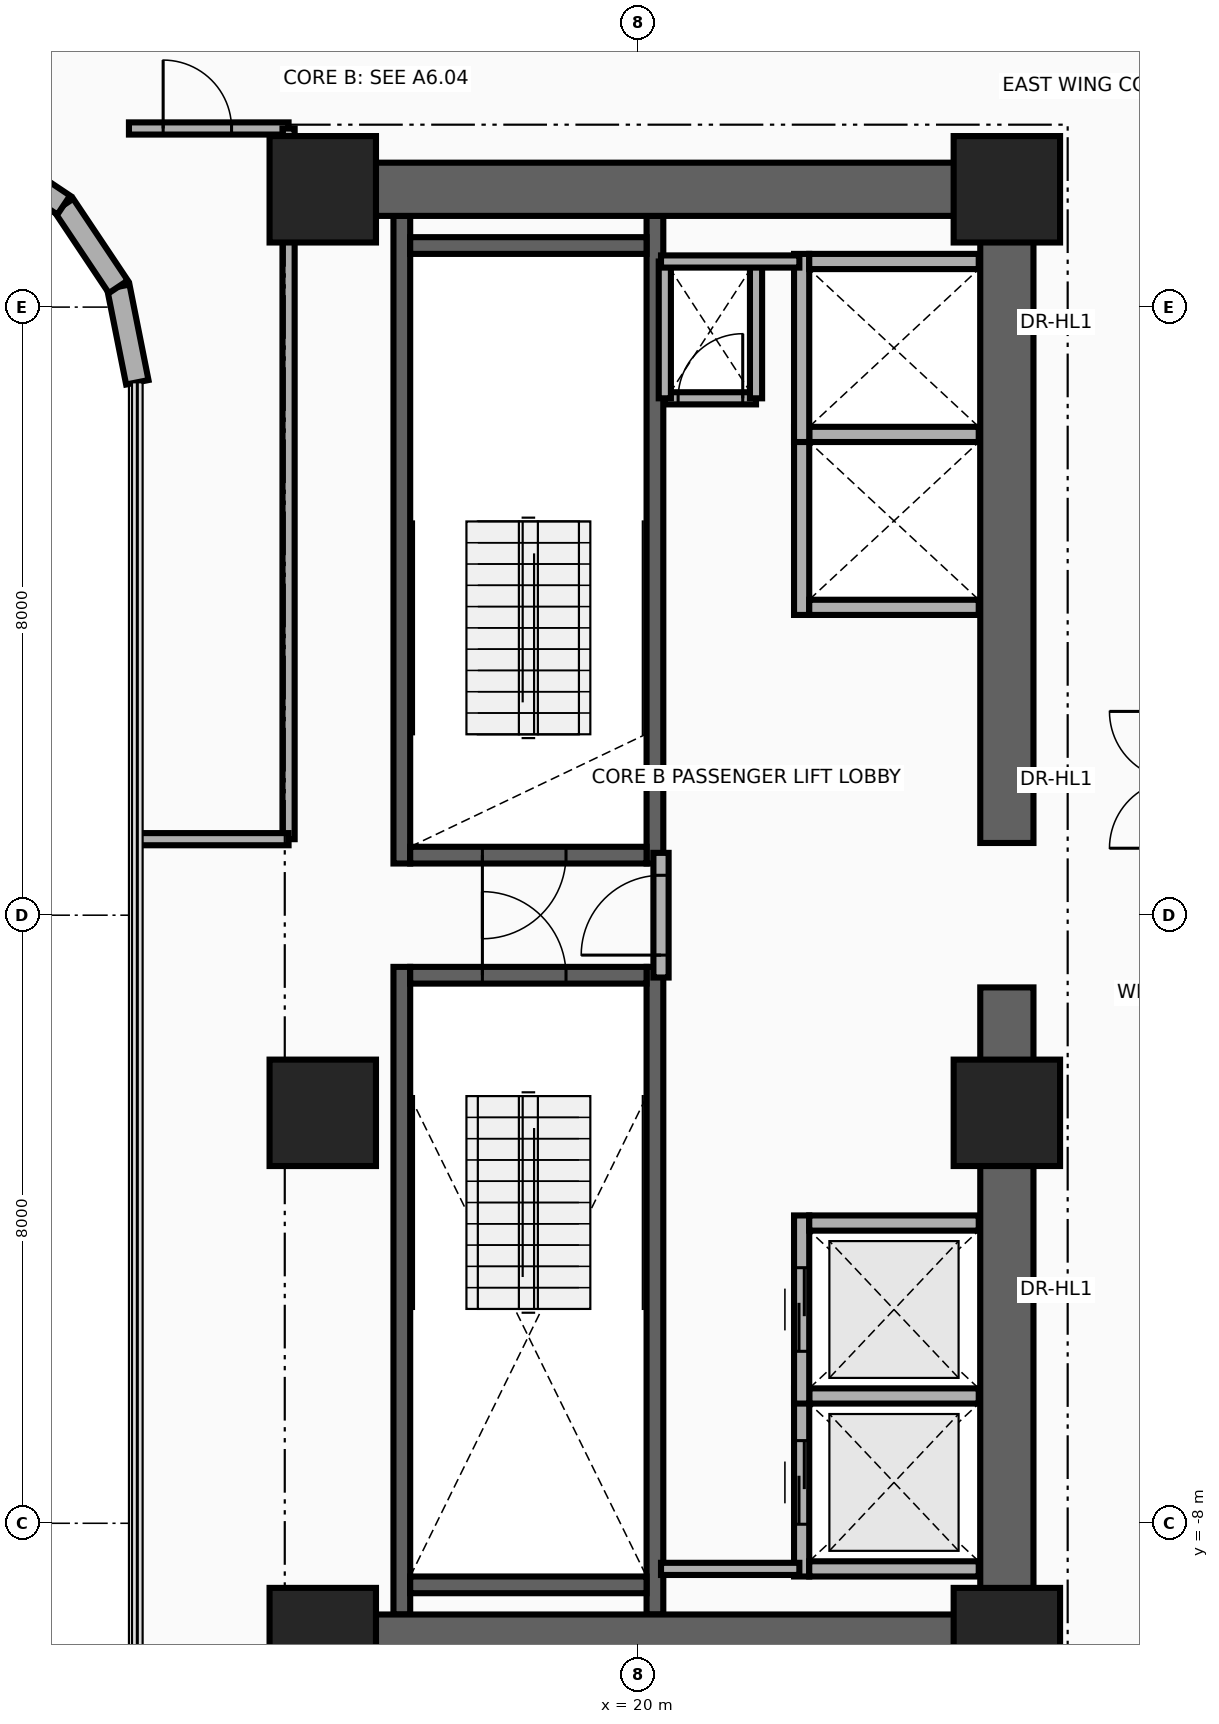
"""IFC4 building model, lengths in metres.
Left out: names, types, materials, properties, quantities, classifications, styles, units other than length and angle.
Written with IfcOpenShell. Run it as: python <this file> out.ifc"""

import sys

from ifc_helpers import new_model, si_unit, direction, frame, frame_2d, origin, origin_2d, place, context, subcontext, project, spatial, rectangle, extrude, source, transform, mapped, element, fill, save


model = new_model("IFC4")
c1 = context("Model", 3, precision=1e-05, world=origin(), true_north=direction((0.0, 1.0)))
c2 = subcontext(c1, "Body", "Model", "MODEL_VIEW")
j1 = project(units=[si_unit("LENGTHUNIT", "METRE"), si_unit("PLANEANGLEUNIT", "RADIAN")], contexts=[c1])
p1 = place(None, origin())
s1 = spatial("IfcSite", under=j1, at=p1, CompositionType="ELEMENT")
p2 = place(p1, origin())
s2 = spatial("IfcBuilding", under=s1, at=p2, CompositionType="ELEMENT")
p3 = place(p2, frame((0.0, 0.0, 40.8)))
s3 = spatial("IfcBuildingStorey", under=s2, at=p3, CompositionType="ELEMENT", Elevation=40.8)
for number, where, z_axis, x_axis in (
    (1, (16.89, 0.68, 0.0), (0.0, 0.0, 1.0), (0.0, 1.0, 0.0)),
    (2, (20.22, 0.68, 0.0), (0.0, 0.0, 1.0), (0.0, 1.0, 0.0)),
):
    element("IfcWall", number, at=place(p3, frame(where, z_axis=z_axis, x_axis=x_axis)), inside=s3, PredefinedType="SHEAR", context=c2, shape_type="SweptSolid", body=[
        extrude(rectangle(XDim=8.52, YDim=0.22, at=frame_2d((4.26, 0.0))), origin(), (0.0, 0.0, 1.0), 3.46),
    ])
p4 = place(p3, frame((17.0, 0.79, 0.0), z_axis=(0.0, 0.0, 1.0), x_axis=(1.0, 0.0, 0.0)))
e3 = element("IfcWall", 3, at=p4, inside=s3, PredefinedType="SHEAR", context=c2, shape_type="SweptSolid", body=[
    extrude(rectangle(XDim=3.11, YDim=0.22, at=frame_2d((1.555, 0.0))), origin(), (0.0, 0.0, 1.0), 3.46),
])
p5 = place(p4, frame((0.95, 0.0, 0.0)))
e4 = element("IfcOpeningElement", 4, at=p5, cuts=e3, PredefinedType="OPENING", context=c2, shape_type="SweptSolid", body=[
    extrude(rectangle(XDim=1.1, YDim=2.15, at=frame_2d((0.55, 1.075))), frame((0.0, 0.125, 0.0), z_axis=(0.0, -1.0, 0.0), x_axis=(1.0, 0.0, 0.0)), (0.0, 0.0, 1.0), 0.25),
])
p6 = place(p3, frame((17.0, 8.81, 0.0), z_axis=(0.0, 0.0, 1.0), x_axis=(1.0, 0.0, 0.0)))
e5 = element("IfcWall", 5, at=p6, inside=s3, PredefinedType="SHEAR", context=c2, shape_type="SweptSolid", body=[
    extrude(rectangle(XDim=3.11, YDim=0.22, at=frame_2d((1.555, 0.0))), origin(), (0.0, 0.0, 1.0), 3.46),
])
for number, where, z_axis, x_axis in (
    (6, (16.89, -9.2, 0.0), (0.0, 0.0, 1.0), (0.0, 1.0, 0.0)),
    (7, (20.22, -9.2, 0.0), (0.0, 0.0, 1.0), (0.0, 1.0, 0.0)),
):
    element("IfcWall", number, at=place(p3, frame(where, z_axis=z_axis, x_axis=x_axis)), inside=s3, PredefinedType="SHEAR", context=c2, shape_type="SweptSolid", body=[
        extrude(rectangle(XDim=8.52, YDim=0.22, at=frame_2d((4.26, 0.0))), origin(), (0.0, 0.0, 1.0), 3.46),
    ])
p7 = place(p3, frame((17.0, -8.81, 0.0), z_axis=(0.0, 0.0, 1.0), x_axis=(1.0, 0.0, 0.0)))
e8 = element("IfcWall", 8, at=p7, inside=s3, PredefinedType="SHEAR", context=c2, shape_type="SweptSolid", body=[
    extrude(rectangle(XDim=3.11, YDim=0.22, at=frame_2d((1.555, 0.0))), origin(), (0.0, 0.0, 1.0), 3.46),
])
p8 = place(p3, frame((17.0, -0.79, 0.0), z_axis=(0.0, 0.0, 1.0), x_axis=(1.0, 0.0, 0.0)))
e9 = element("IfcWall", 9, at=p8, inside=s3, PredefinedType="SHEAR", context=c2, shape_type="SweptSolid", body=[
    extrude(rectangle(XDim=3.11, YDim=0.22, at=frame_2d((1.555, 0.0))), origin(), (0.0, 0.0, 1.0), 3.46),
])
p9 = place(p8, frame((0.95, 0.0, 0.0)))
e10 = element("IfcOpeningElement", 10, at=p9, cuts=e9, PredefinedType="OPENING", context=c2, shape_type="SweptSolid", body=[
    extrude(rectangle(XDim=1.1, YDim=2.15, at=frame_2d((0.55, 1.075))), frame((0.0, 0.125, 0.0), z_axis=(0.0, -1.0, 0.0), x_axis=(1.0, 0.0, 0.0)), (0.0, 0.0, 1.0), 0.25),
])
for number, where, z_axis, x_axis in (
    (11, (24.85, -9.9, 0.0), (0.0, 0.0, 1.0), (0.0, 1.0, 0.0)),
    (12, (24.85, 0.95, 0.0), (0.0, 0.0, 1.0), (0.0, 1.0, 0.0)),
):
    element("IfcWall", number, at=place(p3, frame(where, z_axis=z_axis, x_axis=x_axis)), inside=s3, PredefinedType="SHEAR", context=c2, shape_type="SweptSolid", body=[
        extrude(rectangle(XDim=8.95, YDim=0.7, at=frame_2d((4.475, 0.0))), origin(), (0.0, 0.0, 1.0), 3.46),
    ])
for number, where, z_axis, x_axis in (
    (13, (15.85, 9.55, 0.0), (0.0, 0.0, 1.0), (1.0, 0.0, 0.0)),
    (14, (15.85, -9.55, 0.0), (0.0, 0.0, 1.0), (1.0, 0.0, 0.0)),
):
    element("IfcWall", number, at=place(p3, frame(where, z_axis=z_axis, x_axis=x_axis)), inside=s3, PredefinedType="SHEAR", context=c2, shape_type="SweptSolid", body=[
        extrude(rectangle(XDim=9.0, YDim=0.7, at=frame_2d((4.5, 0.0))), origin(), (0.0, 0.0, 1.0), 3.46),
    ])
m1 = source(origin(), c2, "Body", "SweptSolid", [
    extrude(rectangle(XDim=1.4, YDim=1.4, at=origin_2d()), origin(), (0.0, 0.0, 1.0), 3.7),
])
for number, where, z_axis, x_axis in (
    (15, (15.85, -9.55, 0.0), (0.0, 0.0, 1.0), (1.0, 0.0, 0.0)),
    (16, (24.85, -9.55, 0.0), (0.0, 0.0, 1.0), (1.0, 0.0, 0.0)),
    (17, (15.85, -2.6, 0.0), (0.0, 0.0, 1.0), (1.0, 0.0, 0.0)),
    (18, (24.85, -2.6, 0.0), (0.0, 0.0, 1.0), (1.0, 0.0, 0.0)),
    (19, (15.85, 9.55, 0.0), (0.0, 0.0, 1.0), (1.0, 0.0, 0.0)),
    (20, (24.85, 9.55, 0.0), (0.0, 0.0, 1.0), (1.0, 0.0, 0.0)),
):
    element("IfcColumn", number, at=place(p3, frame(where, z_axis=z_axis, x_axis=x_axis)), inside=s3, PredefinedType="COLUMN", context=c2, shape_type="MappedRepresentation", body=[
        mapped(m1, transform((0.0, 0.0, 0.0), x_axis=(1.0, 0.0, 0.0), y_axis=(0.0, 1.0, 0.0), z_axis=(0.0, 0.0, 1.0), scale=1.0)),
    ])
p10 = place(p3, frame((13.41, 7.011, 0.0), z_axis=(0.0, 0.0, 1.0), x_axis=(-0.195090163074, 0.980785312019, 0.0)))
e21 = element("IfcWall", 21, at=p10, inside=s3, PredefinedType="SOLIDWALL", context=c2, shape_type="SweptSolid", body=[
    extrude(rectangle(XDim=1.281, YDim=0.3, at=frame_2d((0.641, 0.0))), origin(), (0.0, 0.0, 1.0), 3.46),
])
for number, where, z_axis, x_axis in (
    (22, (13.16, 8.268, 0.0), (0.0, 0.0, 1.0), (-0.556, 0.831, 0.0)),
    (23, (12.442, 9.342, 0.0), (0.0, 0.0, 1.0), (-0.831, 0.556, 0.0)),
):
    element("IfcWall", number, at=place(p3, frame(where, z_axis=z_axis, x_axis=x_axis)), inside=s3, PredefinedType="SOLIDWALL", context=c2, shape_type="SweptSolid", body=[
        extrude(rectangle(XDim=1.292, YDim=0.3, at=frame_2d((0.646, 0.0))), origin(), (0.0, 0.0, 1.0), 3.46),
    ])
p11 = place(p3, frame((22.15, -8.7, 0.0), z_axis=(0.0, 0.0, 1.0), x_axis=(0.0, 1.0, 0.0)))
e24 = element("IfcWall", 24, at=p11, inside=s3, PredefinedType="MOVABLE", context=c2, shape_type="SweptSolid", body=[
    extrude(rectangle(XDim=2.475, YDim=0.2, at=frame_2d((1.237, 0.0))), origin(), (0.0, 0.0, 1.0), 3.46),
])
p12 = place(p11, frame((0.688, 0.0, 0.0)))
e25 = element("IfcOpeningElement", 25, at=p12, cuts=e24, PredefinedType="OPENING", context=c2, shape_type="SweptSolid", body=[
    extrude(rectangle(XDim=1.1, YDim=2.1, at=frame_2d((0.55, 1.05))), frame((0.0, 0.115, 0.0), z_axis=(0.0, -1.0, 0.0), x_axis=(1.0, 0.0, 0.0)), (0.0, 0.0, 1.0), 0.23),
])
for number, where, z_axis, x_axis in (
    (26, (22.25, -8.6, 0.0), (0.0, 0.0, 1.0), (1.0, 0.0, 0.0)),
    (27, (22.25, -6.325, 0.0), (0.0, 0.0, 1.0), (1.0, 0.0, 0.0)),
):
    element("IfcWall", number, at=place(p3, frame(where, z_axis=z_axis, x_axis=x_axis)), inside=s3, PredefinedType="MOVABLE", context=c2, shape_type="SweptSolid", body=[
        extrude(rectangle(XDim=2.23, YDim=0.2, at=frame_2d((1.115, 0.0))), origin(), (0.0, 0.0, 1.0), 3.46),
    ])
p13 = place(p3, frame((22.15, -6.425, 0.0), z_axis=(0.0, 0.0, 1.0), x_axis=(0.0, 1.0, 0.0)))
e28 = element("IfcWall", 28, at=p13, inside=s3, PredefinedType="MOVABLE", context=c2, shape_type="SweptSolid", body=[
    extrude(rectangle(XDim=2.475, YDim=0.2, at=frame_2d((1.238, 0.0))), origin(), (0.0, 0.0, 1.0), 3.46),
])
p14 = place(p13, frame((0.688, 0.0, 0.0)))
e29 = element("IfcOpeningElement", 29, at=p14, cuts=e28, PredefinedType="OPENING", context=c2, shape_type="SweptSolid", body=[
    extrude(rectangle(XDim=1.1, YDim=2.1, at=frame_2d((0.55, 1.05))), frame((0.0, 0.115, 0.0), z_axis=(0.0, -1.0, 0.0), x_axis=(1.0, 0.0, 0.0)), (0.0, 0.0, 1.0), 0.23),
])
p15 = place(p3, frame((22.25, -4.05, 0.0), z_axis=(0.0, 0.0, 1.0), x_axis=(1.0, 0.0, 0.0)))
e30 = element("IfcWall", 30, at=p15, inside=s3, PredefinedType="MOVABLE", context=c2, shape_type="SweptSolid", body=[
    extrude(rectangle(XDim=2.23, YDim=0.2, at=frame_2d((1.115, 0.0))), origin(), (0.0, 0.0, 1.0), 3.46),
])
p16 = place(p3, frame((22.15, 3.95, 0.0), z_axis=(0.0, 0.0, 1.0), x_axis=(0.0, 1.0, 0.0)))
e31 = element("IfcWall", 31, at=p16, inside=s3, PredefinedType="MOVABLE", context=c2, shape_type="SweptSolid", body=[
    extrude(rectangle(XDim=2.475, YDim=0.2, at=frame_2d((1.238, 0.0))), origin(), (0.0, 0.0, 1.0), 3.46),
])
for number, where, z_axis, x_axis in (
    (32, (22.25, 4.05, 0.0), (0.0, 0.0, 1.0), (1.0, 0.0, 0.0)),
    (33, (22.25, 6.325, 0.0), (0.0, 0.0, 1.0), (1.0, 0.0, 0.0)),
):
    element("IfcWall", number, at=place(p3, frame(where, z_axis=z_axis, x_axis=x_axis)), inside=s3, PredefinedType="MOVABLE", context=c2, shape_type="SweptSolid", body=[
        extrude(rectangle(XDim=2.23, YDim=0.2, at=frame_2d((1.115, 0.0))), origin(), (0.0, 0.0, 1.0), 2.245),
    ])
p17 = place(p3, frame((22.15, 6.225, 0.0), z_axis=(0.0, 0.0, 1.0), x_axis=(0.0, 1.0, 0.0)))
e34 = element("IfcWall", 34, at=p17, inside=s3, PredefinedType="MOVABLE", context=c2, shape_type="SweptSolid", body=[
    extrude(rectangle(XDim=2.475, YDim=0.2, at=frame_2d((1.237, 0.0))), origin(), (0.0, 0.0, 1.0), 3.46),
])
p18 = place(p3, frame((22.25, 8.6, 0.0), z_axis=(0.0, 0.0, 1.0), x_axis=(1.0, 0.0, 0.0)))
e35 = element("IfcWall", 35, at=p18, inside=s3, PredefinedType="MOVABLE", context=c2, shape_type="SweptSolid", body=[
    extrude(rectangle(XDim=2.23, YDim=0.2, at=frame_2d((1.115, 0.0))), origin(), (0.0, 0.0, 1.0), 2.245),
])
p19 = place(p3, frame((20.3, -0.82, 0.0), z_axis=(0.0, 0.0, 1.0), x_axis=(0.0, 1.0, 0.0)))
e36 = element("IfcWall", 36, at=p19, inside=s3, PredefinedType="PARTITIONING", context=c2, shape_type="SweptSolid", body=[
    extrude(rectangle(XDim=1.64, YDim=0.2, at=frame_2d((0.82, 0.0))), origin(), (0.0, 0.0, 1.0), 3.46),
])
p20 = place(p19, frame((0.295, 0.0, 0.0)))
e37 = element("IfcOpeningElement", 37, at=p20, cuts=e36, PredefinedType="OPENING", context=c2, shape_type="SweptSolid", body=[
    extrude(rectangle(XDim=1.05, YDim=2.15, at=frame_2d((0.525, 1.075))), frame((0.0, 0.115, 0.0), z_axis=(0.0, -1.0, 0.0), x_axis=(1.0, 0.0, 0.0)), (0.0, 0.0, 1.0), 0.23),
])
p21 = place(p3, frame((20.35, 6.8, 0.0), z_axis=(0.0, 0.0, 1.0), x_axis=(1.0, 0.0, 0.0)))
e38 = element("IfcWall", 38, at=p21, inside=s3, PredefinedType="PARTITIONING", context=c2, shape_type="SweptSolid", body=[
    extrude(rectangle(XDim=1.2, YDim=0.16, at=frame_2d((0.6, 0.0))), origin(), (0.0, 0.0, 1.0), 3.46),
])
p22 = place(p21, frame((0.175, 0.0, 0.0)))
e39 = element("IfcOpeningElement", 39, at=p22, cuts=e38, PredefinedType="OPENING", context=c2, shape_type="SweptSolid", body=[
    extrude(rectangle(XDim=0.85, YDim=2.05, at=frame_2d((0.425, 1.025))), frame((0.0, 0.095, 0.0), z_axis=(0.0, -1.0, 0.0), x_axis=(1.0, 0.0, 0.0)), (0.0, 0.0, 1.0), 0.19),
])
for number, where, z_axis, x_axis in (
    (40, (21.55, 6.8, 0.0), (0.0, 0.0, 1.0), (0.0, 1.0, 0.0)),
    (41, (20.35, 6.8, 0.0), (0.0, 0.0, 1.0), (0.0, 1.0, 0.0)),
):
    element("IfcWall", number, at=place(p3, frame(where, z_axis=z_axis, x_axis=x_axis)), inside=s3, PredefinedType="PARTITIONING", context=c2, shape_type="SweptSolid", body=[
        extrude(rectangle(XDim=1.8, YDim=0.16, at=frame_2d((0.9, 0.0))), origin(), (0.0, 0.0, 1.0), 3.46),
    ])
for number, where, z_axis, x_axis in (
    (42, (20.3, -8.6, 0.0), (0.0, 0.0, 1.0), (1.0, 0.0, 0.0)),
    (43, (20.3, 8.6, 0.0), (0.0, 0.0, 1.0), (1.0, 0.0, 0.0)),
):
    element("IfcWall", number, at=place(p3, frame(where, z_axis=z_axis, x_axis=x_axis)), inside=s3, PredefinedType="PARTITIONING", context=c2, shape_type="SweptSolid", body=[
        extrude(rectangle(XDim=1.82, YDim=0.16, at=frame_2d((0.91, 0.0))), origin(), (0.0, 0.0, 1.0), 3.46),
    ])
p23 = place(p3, frame((13.3, 10.35, 0.0), z_axis=(0.0, 0.0, 1.0), x_axis=(1.0, 0.0, 0.0)))
e44 = element("IfcWall", 44, at=p23, inside=s3, PredefinedType="PARTITIONING", context=c2, shape_type="SweptSolid", body=[
    extrude(rectangle(XDim=2.1, YDim=0.16, at=frame_2d((1.05, 0.0))), origin(), (0.0, 0.0, 1.0), 2.583),
])
p24 = place(p23, frame((0.45, 0.0, 0.0)))
e45 = element("IfcOpeningElement", 45, at=p24, cuts=e44, PredefinedType="OPENING", context=c2, shape_type="SweptSolid", body=[
    extrude(rectangle(XDim=0.9, YDim=2.1, at=frame_2d((0.45, 1.05))), frame((0.0, 0.095, 0.0), z_axis=(0.0, -1.0, 0.0), x_axis=(1.0, 0.0, 0.0)), (0.0, 0.0, 1.0), 0.19),
])
p25 = place(p3, frame((15.4, 1.0, 0.0), z_axis=(0.0, 0.0, 1.0), x_axis=(0.0, 1.0, 0.0)))
e46 = element("IfcWall", 46, at=p25, inside=s3, PredefinedType="PARTITIONING", context=c2, shape_type="SweptSolid", body=[
    extrude(rectangle(XDim=9.35, YDim=0.16, at=frame_2d((4.675, 0.0))), origin(), (0.0, 0.0, 1.0), 2.245),
])
p26 = place(p3, frame((13.41, 1.0, 0.0), z_axis=(0.0, 0.0, 1.0), x_axis=(1.0, 0.0, 0.0)))
e47 = element("IfcWall", 47, at=p26, inside=s3, PredefinedType="PARTITIONING", context=c2, shape_type="SweptSolid", body=[
    extrude(rectangle(XDim=1.99, YDim=0.16, at=frame_2d((0.995, 0.0))), origin(), (0.0, 0.0, 1.0), 2.245),
])
p27 = place(p12, origin())
e48 = element("IfcDoor", 48, at=p27, inside=s3, OperationType="DOUBLE_DOOR_SLIDING", PredefinedType="DOOR", context=c2, shape_type="SweptSolid", body=[
    extrude(rectangle(XDim=1.1, YDim=2.1, at=frame_2d((0.55, 1.05))), frame((0.0, 0.025, 0.0), z_axis=(0.0, -1.0, 0.0), x_axis=(1.0, 0.0, 0.0)), (0.0, 0.0, 1.0), 0.05),
])
fill(e25, e48)
p28 = place(p14, origin())
e49 = element("IfcDoor", 49, at=p28, inside=s3, OperationType="DOUBLE_DOOR_SLIDING", PredefinedType="DOOR", context=c2, shape_type="SweptSolid", body=[
    extrude(rectangle(XDim=1.1, YDim=2.1, at=frame_2d((0.55, 1.05))), frame((0.0, 0.025, 0.0), z_axis=(0.0, -1.0, 0.0), x_axis=(1.0, 0.0, 0.0)), (0.0, 0.0, 1.0), 0.05),
])
fill(e29, e49)
p29 = place(p20, origin())
e50 = element("IfcDoor", 50, at=p29, inside=s3, OperationType="SINGLE_SWING_RIGHT", PredefinedType="DOOR", context=c2, shape_type="SweptSolid", body=[
    extrude(rectangle(XDim=1.05, YDim=2.15, at=frame_2d((0.525, 1.075))), frame((0.0, 0.025, 0.0), z_axis=(0.0, -1.0, 0.0), x_axis=(1.0, 0.0, 0.0)), (0.0, 0.0, 1.0), 0.05),
])
fill(e37, e50)
p30 = place(p5, frame((1.1, 0.0, 0.0), z_axis=(0.0, 0.0, 1.0), x_axis=(-1.0, 0.0, 0.0)))
e51 = element("IfcDoor", 51, at=p30, inside=s3, OperationType="SINGLE_SWING_LEFT", PredefinedType="DOOR", context=c2, shape_type="SweptSolid", body=[
    extrude(rectangle(XDim=1.1, YDim=2.15, at=frame_2d((0.55, 1.075))), frame((0.0, 0.025, 0.0), z_axis=(0.0, -1.0, 0.0), x_axis=(1.0, 0.0, 0.0)), (0.0, 0.0, 1.0), 0.05),
])
fill(e4, e51)
p31 = place(p9, origin())
e52 = element("IfcDoor", 52, at=p31, inside=s3, OperationType="SINGLE_SWING_RIGHT", PredefinedType="DOOR", context=c2, shape_type="SweptSolid", body=[
    extrude(rectangle(XDim=1.1, YDim=2.15, at=frame_2d((0.55, 1.075))), frame((0.0, 0.025, 0.0), z_axis=(0.0, -1.0, 0.0), x_axis=(1.0, 0.0, 0.0)), (0.0, 0.0, 1.0), 0.05),
])
fill(e10, e52)
p32 = place(p22, origin())
e53 = element("IfcDoor", 53, at=p32, inside=s3, OperationType="SINGLE_SWING_LEFT", PredefinedType="DOOR", context=c2, shape_type="SweptSolid", body=[
    extrude(rectangle(XDim=0.85, YDim=2.05, at=frame_2d((0.425, 1.025))), frame((0.0, 0.025, 0.0), z_axis=(0.0, -1.0, 0.0), x_axis=(1.0, 0.0, 0.0)), (0.0, 0.0, 1.0), 0.05),
])
fill(e39, e53)
p33 = place(p24, origin())
e54 = element("IfcDoor", 54, at=p33, inside=s3, OperationType="SINGLE_SWING_RIGHT", PredefinedType="DOOR", context=c2, shape_type="SweptSolid", body=[
    extrude(rectangle(XDim=0.9, YDim=2.1, at=frame_2d((0.45, 1.05))), frame((0.0, 0.025, 0.0), z_axis=(0.0, -1.0, 0.0), x_axis=(1.0, 0.0, 0.0)), (0.0, 0.0, 1.0), 0.05),
])
fill(e45, e54)
save(model, sys.argv[1])
